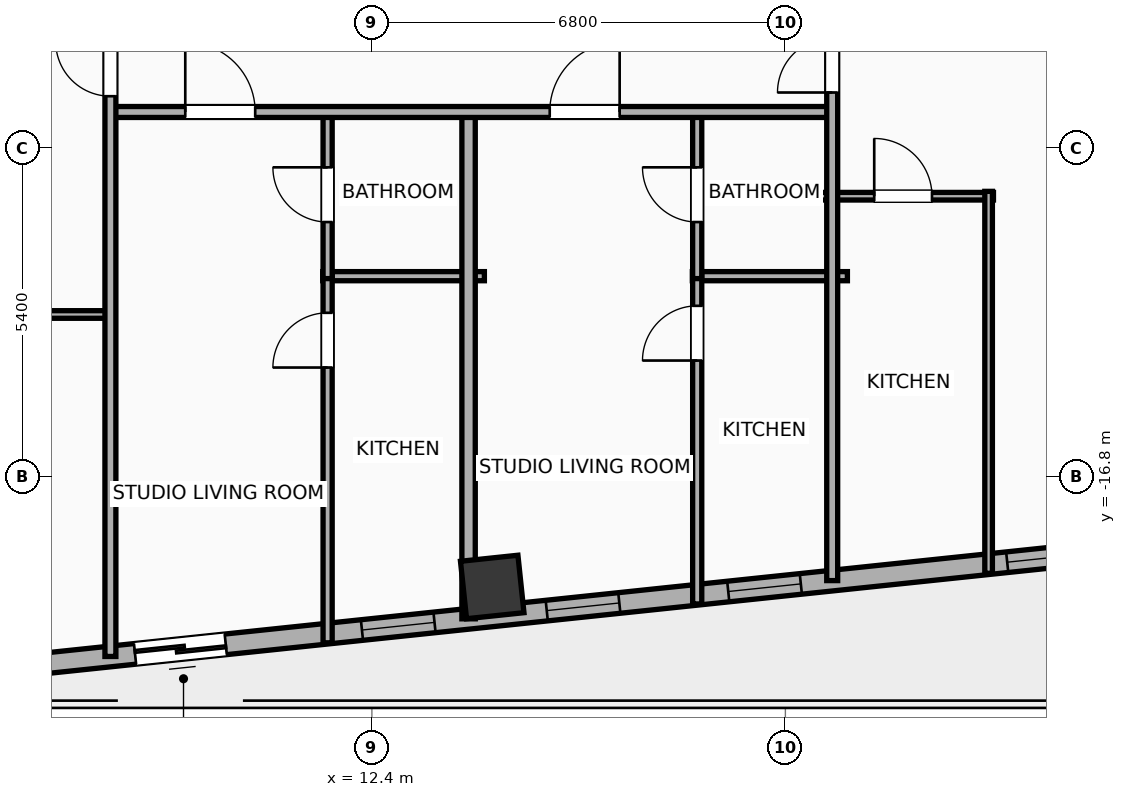
"""IFC4 building model, lengths in metres.
Left out: names, types, materials, properties, quantities, classifications, styles, units other than length and angle.
Written with IfcOpenShell. Run it as: python <this file> out.ifc"""

import sys

from ifc_helpers import new_model, si_unit, direction, frame, frame_2d, origin, origin_2d, place, context, subcontext, project, spatial, rectangle, hollow_rectangle, extrude, element, fill, save


model = new_model("IFC4")
c1 = context("Model", 3, precision=1e-05, world=origin(), true_north=direction((0.0, 1.0)))
c2 = subcontext(c1, "Body", "Model", "MODEL_VIEW")
j1 = project(units=[si_unit("LENGTHUNIT", "METRE"), si_unit("PLANEANGLEUNIT", "RADIAN")], contexts=[c1])
p1 = place(None, origin())
s1 = spatial("IfcSite", under=j1, at=p1, CompositionType="ELEMENT")
p2 = place(p1, origin())
s2 = spatial("IfcBuilding", under=s1, at=p2, CompositionType="ELEMENT")
p3 = place(p2, frame((0.0, 0.0, 140.4)))
s3 = spatial("IfcBuildingStorey", under=s2, at=p3, CompositionType="ELEMENT", Elevation=140.4)
p4 = place(p3, frame((14.379, -18.611, -0.4), z_axis=(0.0, 0.0, 1.0), x_axis=(0.994521895368, 0.104528463268, 0.0)))
e1 = element("IfcColumn", 1, at=p4, inside=s3, PredefinedType="COLUMN", context=c2, shape_type="SweptSolid", body=[
    extrude(hollow_rectangle(XDim=0.95, YDim=0.95, WallThickness=0.032, at=origin_2d()), origin(), (0.0, 0.0, 1.0), 4.3),
])
p5 = place(p3, frame((24.756, -18.003, 0.0), z_axis=(0.0, 0.0, 1.0), x_axis=(-0.99452160744, -0.104531202687, 0.0)))
e2 = element("IfcWall", 2, at=p5, inside=s3, PredefinedType="ELEMENTEDWALL", context=c2, shape_type="SweptSolid", body=[
    extrude(rectangle(XDim=51.967, YDim=0.34, at=frame_2d((25.983, 0.0))), origin(), (0.0, 0.0, 1.0), 2.54),
])
p6 = place(p5, frame((14.84, 0.0, 0.0)))
e3 = element("IfcOpeningElement", 3, at=p6, cuts=e2, PredefinedType="OPENING", context=c2, shape_type="SweptSolid", body=[
    extrude(rectangle(XDim=1.5, YDim=2.05, at=frame_2d((0.75, 1.025))), frame((0.0, 0.18, 0.0), z_axis=(0.0, -1.0, 0.0), x_axis=(1.0, 0.0, 0.0)), (0.0, 0.0, 1.0), 0.36),
])
p7 = place(p5, frame((25.633, 0.0, 0.75)))
e4 = element("IfcOpeningElement", 4, at=p7, cuts=e2, PredefinedType="OPENING", context=c2, shape_type="SweptSolid", body=[
    extrude(rectangle(XDim=2.4, YDim=1.63, at=frame_2d((1.2, 0.815))), frame((0.0, 0.18, 0.0), z_axis=(0.0, -1.0, 0.0), x_axis=(1.0, 0.0, 0.0)), (0.0, 0.0, 1.0), 0.36),
])
p8 = place(p5, frame((42.955, 0.0, 0.75)))
e5 = element("IfcOpeningElement", 5, at=p8, cuts=e2, PredefinedType="OPENING", context=c2, shape_type="SweptSolid", body=[
    extrude(rectangle(XDim=2.4, YDim=1.63, at=frame_2d((1.2, 0.815))), frame((0.0, 0.18, 0.0), z_axis=(0.0, -1.0, 0.0), x_axis=(1.0, 0.0, 0.0)), (0.0, 0.0, 1.0), 0.36),
])
p9 = place(p5, frame((34.121, 0.0, 0.75)))
e6 = element("IfcOpeningElement", 6, at=p9, cuts=e2, PredefinedType="OPENING", context=c2, shape_type="SweptSolid", body=[
    extrude(rectangle(XDim=1.2, YDim=1.63, at=frame_2d((0.6, 0.815))), frame((0.0, 0.18, 0.0), z_axis=(0.0, -1.0, 0.0), x_axis=(1.0, 0.0, 0.0)), (0.0, 0.0, 1.0), 0.36),
])
p10 = place(p5, frame((37.092, 0.0, 0.75)))
e7 = element("IfcOpeningElement", 7, at=p10, cuts=e2, PredefinedType="OPENING", context=c2, shape_type="SweptSolid", body=[
    extrude(rectangle(XDim=1.2, YDim=1.63, at=frame_2d((0.6, 0.815))), frame((0.0, 0.18, 0.0), z_axis=(0.0, -1.0, 0.0), x_axis=(1.0, 0.0, 0.0)), (0.0, 0.0, 1.0), 0.36),
])
p11 = place(p5, frame((11.388, 0.0, 0.75)))
e8 = element("IfcOpeningElement", 8, at=p11, cuts=e2, PredefinedType="OPENING", context=c2, shape_type="SweptSolid", body=[
    extrude(rectangle(XDim=1.2, YDim=1.63, at=frame_2d((0.6, 0.815))), frame((0.0, 0.18, 0.0), z_axis=(0.0, -1.0, 0.0), x_axis=(1.0, 0.0, 0.0)), (0.0, 0.0, 1.0), 0.36),
])
p12 = place(p5, frame((8.332, 0.0, 0.75)))
e9 = element("IfcOpeningElement", 9, at=p12, cuts=e2, PredefinedType="OPENING", context=c2, shape_type="SweptSolid", body=[
    extrude(rectangle(XDim=1.2, YDim=1.63, at=frame_2d((0.6, 0.815))), frame((0.0, 0.18, 0.0), z_axis=(0.0, -1.0, 0.0), x_axis=(1.0, 0.0, 0.0)), (0.0, 0.0, 1.0), 0.36),
])
p13 = place(p5, frame((5.331, 0.0, 0.75)))
e10 = element("IfcOpeningElement", 10, at=p13, cuts=e2, PredefinedType="OPENING", context=c2, shape_type="SweptSolid", body=[
    extrude(rectangle(XDim=1.2, YDim=1.63, at=frame_2d((0.6, 0.815))), frame((0.0, 0.18, 0.0), z_axis=(0.0, -1.0, 0.0), x_axis=(1.0, 0.0, 0.0)), (0.0, 0.0, 1.0), 0.36),
])
p14 = place(p5, frame((29.313, 0.0, 0.75)))
e11 = element("IfcOpeningElement", 11, at=p14, cuts=e2, PredefinedType="OPENING", context=c2, shape_type="SweptSolid", body=[
    extrude(rectangle(XDim=1.2, YDim=1.63, at=frame_2d((0.6, 0.815))), frame((0.0, 0.18, 0.0), z_axis=(0.0, -1.0, 0.0), x_axis=(1.0, 0.0, 0.0)), (0.0, 0.0, 1.0), 0.36),
])
p15 = place(p5, frame((22.248, 0.0, 0.75)))
e12 = element("IfcOpeningElement", 12, at=p15, cuts=e2, PredefinedType="OPENING", context=c2, shape_type="SweptSolid", body=[
    extrude(rectangle(XDim=1.2, YDim=1.63, at=frame_2d((0.6, 0.815))), frame((0.0, 0.18, 0.0), z_axis=(0.0, -1.0, 0.0), x_axis=(1.0, 0.0, 0.0)), (0.0, 0.0, 1.0), 0.36),
])
p16 = place(p5, frame((18.186, 0.0, 0.75)))
e13 = element("IfcOpeningElement", 13, at=p16, cuts=e2, PredefinedType="OPENING", context=c2, shape_type="SweptSolid", body=[
    extrude(rectangle(XDim=1.2, YDim=1.63, at=frame_2d((0.6, 0.815))), frame((0.0, 0.18, 0.0), z_axis=(0.0, -1.0, 0.0), x_axis=(1.0, 0.0, 0.0)), (0.0, 0.0, 1.0), 0.36),
])
p17 = place(p5, frame((0.718, 0.0, 0.75)))
e14 = element("IfcOpeningElement", 14, at=p17, cuts=e2, PredefinedType="OPENING", context=c2, shape_type="SweptSolid", body=[
    extrude(rectangle(XDim=1.2, YDim=1.63, at=frame_2d((0.6, 0.815))), frame((0.0, 0.18, 0.0), z_axis=(0.0, -1.0, 0.0), x_axis=(1.0, 0.0, 0.0)), (0.0, 0.0, 1.0), 0.36),
])
p18 = place(p3, frame((11.592, -13.5, 0.0), z_axis=(0.0, 0.0, 1.0), x_axis=(1.0, 0.0, 0.0)))
e15 = element("IfcWall", 15, at=p18, inside=s3, PredefinedType="PLUMBINGWALL", context=c2, shape_type="SweptSolid", body=[
    extrude(rectangle(XDim=2.658, YDim=0.15, at=frame_2d((1.329, 0.0))), origin(), (0.0, 0.0, 1.0), 3.65),
])
p19 = place(p3, frame((11.672, -19.529, 0.0), z_axis=(0.0, 0.0, 1.0), x_axis=(0.0, 1.0, 0.0)))
e16 = element("IfcWall", 16, at=p19, inside=s3, PredefinedType="PLUMBINGWALL", context=c2, shape_type="SweptSolid", body=[
    extrude(rectangle(XDim=6.069, YDim=0.15, at=frame_2d((3.035, 0.0))), origin(), (0.0, 0.0, 1.0), 3.65),
])
p20 = place(p19, frame((4.527, 0.0, 0.0)))
e17 = element("IfcOpeningElement", 17, at=p20, cuts=e16, PredefinedType="OPENING", context=c2, shape_type="SweptSolid", body=[
    extrude(rectangle(XDim=0.9, YDim=2.05, at=frame_2d((0.45, 1.025))), frame((0.0, 0.085, 0.0), z_axis=(0.0, -1.0, 0.0), x_axis=(1.0, 0.0, 0.0)), (0.0, 0.0, 1.0), 0.17),
])
p21 = place(p3, frame((11.672, -13.54, 0.0), z_axis=(0.0, 0.0, 1.0), x_axis=(0.0, 1.0, 0.0)))
e18 = element("IfcWall", 18, at=p21, inside=s3, PredefinedType="PLUMBINGWALL", context=c2, shape_type="SweptSolid", body=[
    extrude(rectangle(XDim=2.76, YDim=0.15, at=frame_2d((1.38, 0.0))), origin(), (0.0, 0.0, 1.0), 3.65),
])
p22 = place(p21, frame((0.93, 0.0, 0.0)))
e19 = element("IfcOpeningElement", 19, at=p22, cuts=e18, PredefinedType="OPENING", context=c2, shape_type="SweptSolid", body=[
    extrude(rectangle(XDim=0.9, YDim=2.05, at=frame_2d((0.45, 1.025))), frame((0.0, 0.085, 0.0), z_axis=(0.0, -1.0, 0.0), x_axis=(1.0, 0.0, 0.0)), (0.0, 0.0, 1.0), 0.17),
])
p23 = place(p3, frame((13.99, -19.135, 0.0), z_axis=(0.0, 0.0, 1.0), x_axis=(0.0, 1.0, 0.0)))
e20 = element("IfcWall", 20, at=p23, inside=s3, PredefinedType="PARTITIONING", context=c2, shape_type="SweptSolid", body=[
    extrude(rectangle(XDim=8.415, YDim=0.22, at=frame_2d((4.208, 0.0))), origin(), (0.0, 0.0, 1.0), 2.54),
])
p24 = place(p3, frame((17.67, -13.5, 0.0), z_axis=(0.0, 0.0, 1.0), x_axis=(1.0, 0.0, 0.0)))
e21 = element("IfcWall", 21, at=p24, inside=s3, PredefinedType="PLUMBINGWALL", context=c2, shape_type="SweptSolid", body=[
    extrude(rectangle(XDim=2.55, YDim=0.15, at=frame_2d((1.275, 0.0))), origin(), (0.0, 0.0, 1.0), 3.65),
])
p25 = place(p3, frame((17.75, -18.89, 0.0), z_axis=(0.0, 0.0, 1.0), x_axis=(0.0, 1.0, 0.0)))
e22 = element("IfcWall", 22, at=p25, inside=s3, PredefinedType="PLUMBINGWALL", context=c2, shape_type="SweptSolid", body=[
    extrude(rectangle(XDim=5.43, YDim=0.15, at=frame_2d((2.715, 0.0))), origin(), (0.0, 0.0, 1.0), 3.65),
])
p26 = place(p25, frame((4.003, 0.0, 0.0)))
e23 = element("IfcOpeningElement", 23, at=p26, cuts=e22, PredefinedType="OPENING", context=c2, shape_type="SweptSolid", body=[
    extrude(rectangle(XDim=0.9, YDim=2.05, at=frame_2d((0.45, 1.025))), frame((0.0, 0.085, 0.0), z_axis=(0.0, -1.0, 0.0), x_axis=(1.0, 0.0, 0.0)), (0.0, 0.0, 1.0), 0.17),
])
p27 = place(p3, frame((17.75, -13.54, 0.0), z_axis=(0.0, 0.0, 1.0), x_axis=(0.0, 1.0, 0.0)))
e24 = element("IfcWall", 24, at=p27, inside=s3, PredefinedType="PLUMBINGWALL", context=c2, shape_type="SweptSolid", body=[
    extrude(rectangle(XDim=2.76, YDim=0.15, at=frame_2d((1.38, 0.0))), origin(), (0.0, 0.0, 1.0), 3.65),
])
p28 = place(p27, frame((0.93, 0.0, 0.0)))
e25 = element("IfcOpeningElement", 25, at=p28, cuts=e24, PredefinedType="OPENING", context=c2, shape_type="SweptSolid", body=[
    extrude(rectangle(XDim=0.9, YDim=2.05, at=frame_2d((0.45, 1.025))), frame((0.0, 0.085, 0.0), z_axis=(0.0, -1.0, 0.0), x_axis=(1.0, 0.0, 0.0)), (0.0, 0.0, 1.0), 0.17),
])
p29 = place(p3, frame((8.08, -10.8, 0.0), z_axis=(0.0, 0.0, 1.0), x_axis=(1.0, 0.0, 0.0)))
e26 = element("IfcWall", 26, at=p29, inside=s3, PredefinedType="PARTITIONING", context=c2, shape_type="SweptSolid", body=[
    extrude(rectangle(XDim=11.92, YDim=0.18, at=frame_2d((5.96, 0.0))), origin(), (0.0, 0.0, 1.0), 3.65),
])
p30 = place(p29, frame((1.251, 0.0, 0.0)))
e27 = element("IfcOpeningElement", 27, at=p30, cuts=e26, PredefinedType="OPENING", context=c2, shape_type="SweptSolid", body=[
    extrude(rectangle(XDim=1.15, YDim=2.05, at=frame_2d((0.575, 1.025))), frame((0.0, 0.1, 0.0), z_axis=(0.0, -1.0, 0.0), x_axis=(1.0, 0.0, 0.0)), (0.0, 0.0, 1.0), 0.2),
])
p31 = place(p29, frame((7.244, 0.0, 0.0)))
e28 = element("IfcOpeningElement", 28, at=p31, cuts=e26, PredefinedType="OPENING", context=c2, shape_type="SweptSolid", body=[
    extrude(rectangle(XDim=1.15, YDim=2.05, at=frame_2d((0.575, 1.025))), frame((0.0, 0.1, 0.0), z_axis=(0.0, -1.0, 0.0), x_axis=(1.0, 0.0, 0.0)), (0.0, 0.0, 1.0), 0.2),
])
p32 = place(p3, frame((0.02, -14.13, 0.0), z_axis=(0.0, 0.0, 1.0), x_axis=(1.0, 0.0, 0.0)))
e29 = element("IfcWall", 29, at=p32, inside=s3, PredefinedType="PARTITIONING", context=c2, shape_type="SweptSolid", body=[
    extrude(rectangle(XDim=8.06, YDim=0.125, at=frame_2d((4.03, 0.0))), origin(), (0.0, 0.0, 1.0), 3.65),
])
p33 = place(p32, frame((1.323, 0.0, 0.0)))
e30 = element("IfcOpeningElement", 30, at=p33, cuts=e29, PredefinedType="OPENING", context=c2, shape_type="SweptSolid", body=[
    extrude(rectangle(XDim=0.9, YDim=2.05, at=frame_2d((0.45, 1.025))), frame((0.0, 0.073, 0.0), z_axis=(0.0, -1.0, 0.0), x_axis=(1.0, 0.0, 0.0)), (0.0, 0.0, 1.0), 0.145),
])
p34 = place(p32, frame((5.837, 0.0, 0.0)))
e31 = element("IfcOpeningElement", 31, at=p34, cuts=e29, PredefinedType="OPENING", context=c2, shape_type="SweptSolid", body=[
    extrude(rectangle(XDim=0.9, YDim=2.05, at=frame_2d((0.45, 1.025))), frame((0.0, 0.073, 0.0), z_axis=(0.0, -1.0, 0.0), x_axis=(1.0, 0.0, 0.0)), (0.0, 0.0, 1.0), 0.145),
])
p35 = place(p3, frame((8.1, -19.754, 0.0), z_axis=(0.0, 0.0, 1.0), x_axis=(0.0, 1.0, 0.0)))
e32 = element("IfcWall", 32, at=p35, inside=s3, PredefinedType="PARTITIONING", context=c2, shape_type="SweptSolid", body=[
    extrude(rectangle(XDim=10.464, YDim=0.18, at=frame_2d((5.232, 0.0))), origin(), (0.0, 0.0, 1.0), 3.65),
])
p36 = place(p35, frame((9.213, 0.0, 0.0)))
e33 = element("IfcOpeningElement", 33, at=p36, cuts=e32, PredefinedType="OPENING", context=c2, shape_type="SweptSolid", body=[
    extrude(rectangle(XDim=0.9, YDim=2.05, at=frame_2d((0.45, 1.025))), frame((0.0, 0.1, 0.0), z_axis=(0.0, -1.0, 0.0), x_axis=(1.0, 0.0, 0.0)), (0.0, 0.0, 1.0), 0.2),
])
p37 = place(p3, frame((19.65, -12.185, 0.0), z_axis=(0.0, 0.0, 1.0), x_axis=(1.0, 0.0, 0.0)))
e34 = element("IfcWall", 34, at=p37, inside=s3, PredefinedType="PARTITIONING", context=c2, shape_type="SweptSolid", body=[
    extrude(rectangle(XDim=2.972, YDim=0.125, at=frame_2d((1.486, 0.0))), origin(), (0.0, 0.0, 1.0), 3.65),
])
p38 = place(p37, frame((1.011, 0.0, 0.0)))
e35 = element("IfcOpeningElement", 35, at=p38, cuts=e34, PredefinedType="OPENING", context=c2, shape_type="SweptSolid", body=[
    extrude(rectangle(XDim=0.95, YDim=2.05, at=frame_2d((0.475, 1.025))), frame((0.0, 0.073, 0.0), z_axis=(0.0, -1.0, 0.0), x_axis=(1.0, 0.0, 0.0)), (0.0, 0.0, 1.0), 0.145),
])
p39 = place(p3, frame((22.542, -18.387, 0.0), z_axis=(0.0, 0.0, 1.0), x_axis=(0.0, 1.0, 0.0)))
e36 = element("IfcWall", 36, at=p39, inside=s3, PredefinedType="PARTITIONING", context=c2, shape_type="SweptSolid", body=[
    extrude(rectangle(XDim=6.282, YDim=0.125, at=frame_2d((3.141, 0.0))), origin(), (0.0, 0.0, 1.0), 3.65),
])
p40 = place(p3, frame((19.97, -18.506, 0.0), z_axis=(0.0, 0.0, 1.0), x_axis=(0.0, 1.0, 0.0)))
e37 = element("IfcWall", 37, at=p40, inside=s3, PredefinedType="PARTITIONING", context=c2, shape_type="SweptSolid", body=[
    extrude(rectangle(XDim=16.706, YDim=0.18, at=frame_2d((8.353, 0.0))), origin(), (0.0, 0.0, 1.0), 3.65),
])
p41 = place(p40, frame((8.027, 0.0, 0.0)))
e38 = element("IfcOpeningElement", 38, at=p41, cuts=e37, PredefinedType="OPENING", context=c2, shape_type="SweptSolid", body=[
    extrude(rectangle(XDim=0.9, YDim=2.05, at=frame_2d((0.45, 1.025))), frame((0.0, 0.1, 0.0), z_axis=(0.0, -1.0, 0.0), x_axis=(1.0, 0.0, 0.0)), (0.0, 0.0, 1.0), 0.2),
])
p42 = place(p6, origin())
e39 = element("IfcDoor", 39, at=p42, inside=s3, OperationType="SLIDING_TO_RIGHT", PredefinedType="DOOR", context=c2, shape_type="SweptSolid", body=[
    extrude(rectangle(XDim=1.5, YDim=2.05, at=frame_2d((0.75, 1.025))), frame((0.0, 0.025, 0.0), z_axis=(0.0, -1.0, 0.0), x_axis=(1.0, 0.0, 0.0)), (0.0, 0.0, 1.0), 0.05),
])
fill(e3, e39)
p43 = place(p11, origin())
e40 = element("IfcWindow", 40, at=p43, inside=s3, PartitioningType="SINGLE_PANEL", PredefinedType="WINDOW", context=c2, shape_type="SweptSolid", body=[
    extrude(rectangle(XDim=1.2, YDim=1.63, at=frame_2d((0.6, 0.815))), frame((0.0, 0.03, 0.0), z_axis=(0.0, -1.0, 0.0), x_axis=(1.0, 0.0, 0.0)), (0.0, 0.0, 1.0), 0.06),
])
fill(e8, e40)
p44 = place(p12, origin())
e41 = element("IfcWindow", 41, at=p44, inside=s3, PartitioningType="SINGLE_PANEL", PredefinedType="WINDOW", context=c2, shape_type="SweptSolid", body=[
    extrude(rectangle(XDim=1.2, YDim=1.63, at=frame_2d((0.6, 0.815))), frame((0.0, 0.03, 0.0), z_axis=(0.0, -1.0, 0.0), x_axis=(1.0, 0.0, 0.0)), (0.0, 0.0, 1.0), 0.06),
])
fill(e9, e41)
p45 = place(p13, origin())
e42 = element("IfcWindow", 42, at=p45, inside=s3, PartitioningType="SINGLE_PANEL", PredefinedType="WINDOW", context=c2, shape_type="SweptSolid", body=[
    extrude(rectangle(XDim=1.2, YDim=1.63, at=frame_2d((0.6, 0.815))), frame((0.0, 0.03, 0.0), z_axis=(0.0, -1.0, 0.0), x_axis=(1.0, 0.0, 0.0)), (0.0, 0.0, 1.0), 0.06),
])
fill(e10, e42)
p46 = place(p17, origin())
e43 = element("IfcWindow", 43, at=p46, inside=s3, PartitioningType="SINGLE_PANEL", PredefinedType="WINDOW", context=c2, shape_type="SweptSolid", body=[
    extrude(rectangle(XDim=1.2, YDim=1.63, at=frame_2d((0.6, 0.815))), frame((0.0, 0.03, 0.0), z_axis=(0.0, -1.0, 0.0), x_axis=(1.0, 0.0, 0.0)), (0.0, 0.0, 1.0), 0.06),
])
fill(e14, e43)
p47 = place(p20, origin())
e44 = element("IfcDoor", 44, at=p47, inside=s3, OperationType="SINGLE_SWING_LEFT", PredefinedType="DOOR", context=c2, shape_type="SweptSolid", body=[
    extrude(rectangle(XDim=0.9, YDim=2.05, at=frame_2d((0.45, 1.025))), frame((0.0, 0.025, 0.0), z_axis=(0.0, -1.0, 0.0), x_axis=(1.0, 0.0, 0.0)), (0.0, 0.0, 1.0), 0.05),
])
fill(e17, e44)
p48 = place(p22, origin())
e45 = element("IfcDoor", 45, at=p48, inside=s3, OperationType="SINGLE_SWING_RIGHT", PredefinedType="DOOR", context=c2, shape_type="SweptSolid", body=[
    extrude(rectangle(XDim=0.9, YDim=2.05, at=frame_2d((0.45, 1.025))), frame((0.0, 0.025, 0.0), z_axis=(0.0, -1.0, 0.0), x_axis=(1.0, 0.0, 0.0)), (0.0, 0.0, 1.0), 0.05),
])
fill(e19, e45)
p49 = place(p26, origin())
e46 = element("IfcDoor", 46, at=p49, inside=s3, OperationType="SINGLE_SWING_LEFT", PredefinedType="DOOR", context=c2, shape_type="SweptSolid", body=[
    extrude(rectangle(XDim=0.9, YDim=2.05, at=frame_2d((0.45, 1.025))), frame((0.0, 0.025, 0.0), z_axis=(0.0, -1.0, 0.0), x_axis=(1.0, 0.0, 0.0)), (0.0, 0.0, 1.0), 0.05),
])
fill(e23, e46)
p50 = place(p28, origin())
e47 = element("IfcDoor", 47, at=p50, inside=s3, OperationType="SINGLE_SWING_RIGHT", PredefinedType="DOOR", context=c2, shape_type="SweptSolid", body=[
    extrude(rectangle(XDim=0.9, YDim=2.05, at=frame_2d((0.45, 1.025))), frame((0.0, 0.025, 0.0), z_axis=(0.0, -1.0, 0.0), x_axis=(1.0, 0.0, 0.0)), (0.0, 0.0, 1.0), 0.05),
])
fill(e25, e47)
p51 = place(p30, origin())
e48 = element("IfcDoor", 48, at=p51, inside=s3, OperationType="SINGLE_SWING_LEFT", PredefinedType="DOOR", context=c2, shape_type="SweptSolid", body=[
    extrude(rectangle(XDim=1.15, YDim=2.05, at=frame_2d((0.575, 1.025))), frame((0.0, 0.025, 0.0), z_axis=(0.0, -1.0, 0.0), x_axis=(1.0, 0.0, 0.0)), (0.0, 0.0, 1.0), 0.05),
])
fill(e27, e48)
p52 = place(p31, origin())
e49 = element("IfcDoor", 49, at=p52, inside=s3, OperationType="SINGLE_SWING_RIGHT", PredefinedType="DOOR", context=c2, shape_type="SweptSolid", body=[
    extrude(rectangle(XDim=1.15, YDim=2.05, at=frame_2d((0.575, 1.025))), frame((0.0, 0.025, 0.0), z_axis=(0.0, -1.0, 0.0), x_axis=(1.0, 0.0, 0.0)), (0.0, 0.0, 1.0), 0.05),
])
fill(e28, e49)
p53 = place(p36, origin())
e50 = element("IfcDoor", 50, at=p53, inside=s3, OperationType="SINGLE_SWING_RIGHT", PredefinedType="DOOR", context=c2, shape_type="SweptSolid", body=[
    extrude(rectangle(XDim=0.9, YDim=2.05, at=frame_2d((0.45, 1.025))), frame((0.0, 0.025, 0.0), z_axis=(0.0, -1.0, 0.0), x_axis=(1.0, 0.0, 0.0)), (0.0, 0.0, 1.0), 0.05),
])
fill(e33, e50)
p54 = place(p38, origin())
e51 = element("IfcDoor", 51, at=p54, inside=s3, OperationType="SINGLE_SWING_LEFT", PredefinedType="DOOR", context=c2, shape_type="SweptSolid", body=[
    extrude(rectangle(XDim=0.95, YDim=2.05, at=frame_2d((0.475, 1.025))), frame((0.0, 0.025, 0.0), z_axis=(0.0, -1.0, 0.0), x_axis=(1.0, 0.0, 0.0)), (0.0, 0.0, 1.0), 0.05),
])
fill(e35, e51)
p55 = place(p41, origin())
e52 = element("IfcDoor", 52, at=p55, inside=s3, OperationType="SINGLE_SWING_LEFT", PredefinedType="DOOR", context=c2, shape_type="SweptSolid", body=[
    extrude(rectangle(XDim=0.9, YDim=2.05, at=frame_2d((0.45, 1.025))), frame((0.0, 0.025, 0.0), z_axis=(0.0, -1.0, 0.0), x_axis=(1.0, 0.0, 0.0)), (0.0, 0.0, 1.0), 0.05),
])
fill(e38, e52)
save(model, sys.argv[1])
